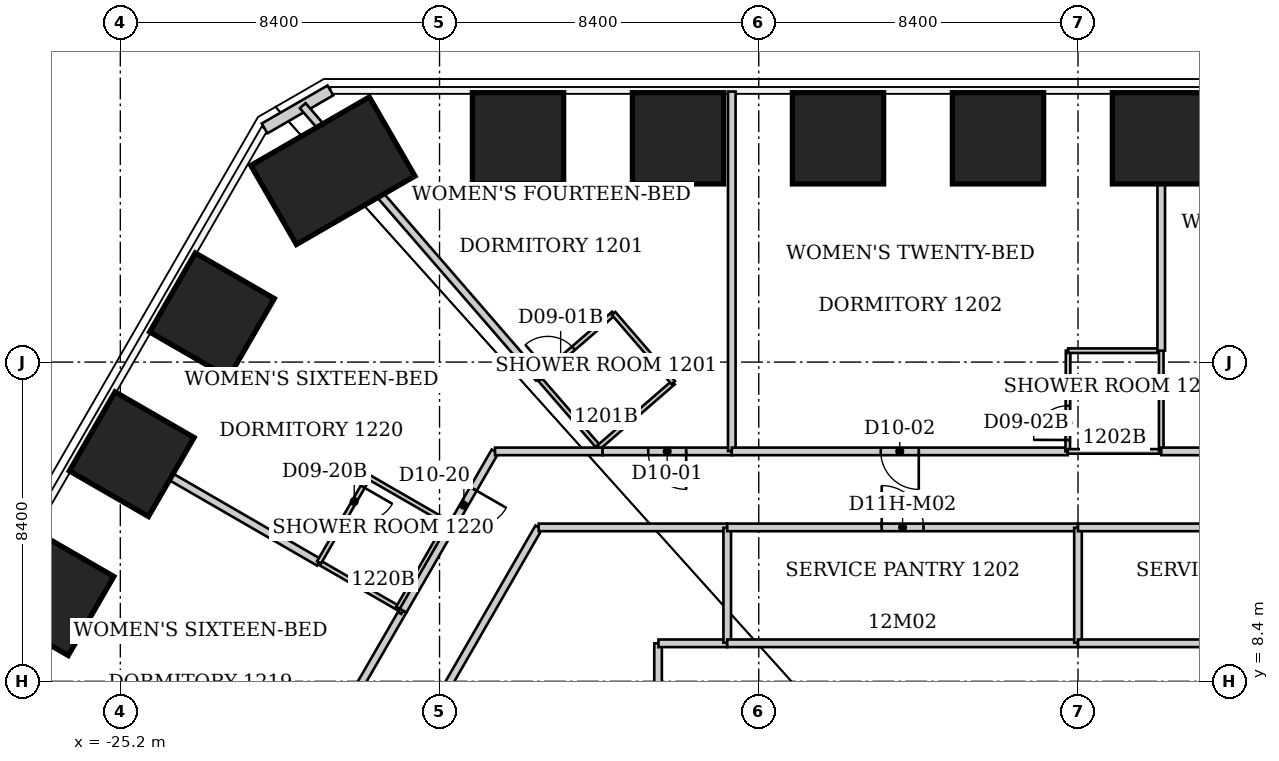
"""IFC4 building model, lengths in metres.
Left out: names, types, materials, properties, quantities, classifications, styles, units other than length and angle.
Written with IfcOpenShell. Run it as: python <this file> out.ifc"""

import sys

from ifc_helpers import new_model, si_unit, direction, frame, frame_2d, origin, origin_2d, place, context, subcontext, project, spatial, rectangle, extrude, clip, halfspace, element, fill, save


model = new_model("IFC4")
c1 = context("Model", 3, precision=1e-05, world=origin(), true_north=direction((0.0, 1.0)))
c2 = subcontext(c1, "Body", "Model", "MODEL_VIEW")
j1 = project(units=[si_unit("LENGTHUNIT", "METRE"), si_unit("PLANEANGLEUNIT", "RADIAN")], contexts=[c1])
p1 = place(None, origin())
s1 = spatial("IfcSite", under=j1, at=p1, CompositionType="ELEMENT")
p2 = place(p1, origin())
s2 = spatial("IfcBuilding", under=s1, at=p2, CompositionType="ELEMENT")
p3 = place(p2, frame((0.0, 0.0, 53.4)))
s3 = spatial("IfcBuildingStorey", under=s2, at=p3, CompositionType="ELEMENT", Elevation=53.4)
p4 = place(p3, frame((-14.735, 22.689, 0.0), z_axis=(0.0, 0.0, 1.0), x_axis=(0.0, 1.0, 0.0)))
e1 = element("IfcColumn", 1, at=p4, inside=s3, PredefinedType="COLUMN", context=c2, shape_type="SweptSolid", body=[
    clip(extrude(rectangle(XDim=2.4, YDim=2.4, at=origin_2d()), origin(), (0.0, 0.0, 1.0), 3.728), halfspace(frame((0.0, 0.0, 3.64)), False)),
])
p5 = place(p3, frame((-10.525, 22.689, 0.0), z_axis=(0.0, 0.0, 1.0), x_axis=(0.0, 1.0, 0.0)))
e2 = element("IfcColumn", 2, at=p5, inside=s3, PredefinedType="COLUMN", context=c2, shape_type="SweptSolid", body=[
    clip(extrude(rectangle(XDim=2.4, YDim=2.4, at=origin_2d()), origin(), (0.0, 0.0, 1.0), 3.736), halfspace(frame((0.0, 0.0, 3.64)), False)),
])
p6 = place(p3, frame((-6.315, 22.689, 0.0), z_axis=(0.0, 0.0, 1.0), x_axis=(0.0, 1.0, 0.0)))
e3 = element("IfcColumn", 3, at=p6, inside=s3, PredefinedType="COLUMN", context=c2, shape_type="SweptSolid", body=[
    clip(extrude(rectangle(XDim=2.4, YDim=2.4, at=origin_2d()), origin(), (0.0, 0.0, 1.0), 3.744), halfspace(frame((0.0, 0.0, 3.64)), False)),
])
for number, where, z_axis, x_axis in (
    (4, (-2.105, 22.689, 0.0), (0.0, 0.0, 1.0), (0.0, 1.0, 0.0)),
    (5, (2.105, 22.689, 0.0), (0.0, 0.0, 1.0), (0.0, 1.0, 0.0)),
):
    element("IfcColumn", number, at=place(p3, frame(where, z_axis=z_axis, x_axis=x_axis)), inside=s3, PredefinedType="COLUMN", context=c2, shape_type="SweptSolid", body=[
        clip(extrude(rectangle(XDim=2.4, YDim=2.4, at=origin_2d()), origin(), (0.0, 0.0, 1.0), 3.752), halfspace(frame((0.0, 0.0, 3.64)), False)),
    ])
p7 = place(p3, frame((-27.01, 10.719, 0.0), z_axis=(0.0, 0.0, 1.0), x_axis=(-0.866025403784, 0.5, 0.0)))
e6 = element("IfcColumn", 6, at=p7, inside=s3, PredefinedType="COLUMN", context=c2, shape_type="SweptSolid", body=[
    clip(extrude(rectangle(XDim=2.4, YDim=2.4, at=origin_2d()), origin(), (0.0, 0.0, 1.0), 3.737), halfspace(frame((0.0, 0.0, 3.64)), False)),
])
p8 = place(p3, frame((-24.899, 14.375, 0.0), z_axis=(0.0, 0.0, 1.0), x_axis=(-0.866025403784, 0.5, 0.0)))
e7 = element("IfcColumn", 7, at=p8, inside=s3, PredefinedType="COLUMN", context=c2, shape_type="SweptSolid", body=[
    clip(extrude(rectangle(XDim=2.4, YDim=2.4, at=origin_2d()), origin(), (0.0, 0.0, 1.0), 3.745), halfspace(frame((0.0, 0.0, 3.64)), False)),
])
p9 = place(p3, frame((-22.788, 18.032, 0.0), z_axis=(0.0, 0.0, 1.0), x_axis=(-0.866025403784, 0.5, 0.0)))
e8 = element("IfcColumn", 8, at=p9, inside=s3, PredefinedType="COLUMN", context=c2, shape_type="SweptSolid", body=[
    clip(extrude(rectangle(XDim=2.4, YDim=2.4, at=origin_2d()), origin(), (0.0, 0.0, 1.0), 3.737), halfspace(frame((0.0, 0.0, 3.64)), False)),
])
p10 = place(p3, frame((-19.606, 21.835, 0.0), z_axis=(0.0, 0.0, 1.0), x_axis=(-0.5, 0.866025403784, 0.0)))
e9 = element("IfcColumn", 9, at=p10, inside=s3, PredefinedType="COLUMN", context=c2, shape_type="SweptSolid", body=[
    clip(extrude(rectangle(XDim=2.4, YDim=3.6, at=origin_2d()), origin(), (0.0, 0.0, 1.0), 3.726), halfspace(frame((0.0, 0.0, 3.64)), False)),
])
p11 = place(p3, frame((-21.404, 22.949, 0.0), z_axis=(0.0, 0.0, 1.0), x_axis=(0.866010750942, 0.50002537861, 0.0)))
e10 = element("IfcWall", 10, at=p11, inside=s3, PredefinedType="SOLIDWALL", context=c2, shape_type="SweptSolid", body=[
    extrude(rectangle(XDim=2.0, YDim=0.3, at=frame_2d((1.0, 0.0))), origin(), (0.0, 0.0, 1.0), 3.64),
])
p12 = place(p3, frame((-25.886, 14.95, 0.0), z_axis=(0.0, 0.0, 1.0), x_axis=(0.865761194987, -0.500457344092, 0.0)))
e11 = element("IfcWall", 11, at=p12, inside=s3, PredefinedType="PARTITIONING", context=c2, shape_type="SweptSolid", body=[
    extrude(rectangle(XDim=6.833, YDim=0.2, at=frame_2d((3.417, 0.0))), origin(), (0.0, 0.0, 1.0), 2.86),
])
p13 = place(p3, frame((-20.748, 5.082, 0.0), z_axis=(0.0, 0.0, 1.0), x_axis=(0.499925128535, 0.86606862653, 0.0)))
e12 = element("IfcWall", 12, at=p13, inside=s3, PredefinedType="PARTITIONING", context=c2, shape_type="SweptSolid", body=[
    extrude(rectangle(XDim=5.979, YDim=0.2, at=frame_2d((2.989, 0.0))), origin(), (0.0, 0.0, 1.0), 3.64),
])
p14 = place(p13, frame((2.489, 0.0, 0.0)))
e13 = element("IfcOpeningElement", 13, at=p14, cuts=e12, PredefinedType="OPENING", context=c2, shape_type="SweptSolid", body=[
    extrude(rectangle(XDim=1.0, YDim=2.13, at=frame_2d((0.5, 1.065))), frame((0.0, 0.1, 0.0), z_axis=(0.0, -1.0, 0.0), x_axis=(1.0, 0.0, 0.0)), (0.0, 0.0, 1.0), 0.2),
])
p15 = place(p3, frame((-20.4, 23.547, 0.0), z_axis=(0.0, 0.0, 1.0), x_axis=(0.65496775452, -0.75565682723, 0.0)))
e14 = element("IfcWall", 14, at=p15, inside=s3, PredefinedType="PARTITIONING", context=c2, shape_type="SweptSolid", body=[
    extrude(rectangle(XDim=9.49, YDim=0.2, at=frame_2d((4.745, 0.0))), origin(), (0.0, 0.0, 1.0), 3.64),
])
p16 = place(p3, frame((-19.97, 11.53, 0.0), z_axis=(0.0, 0.0, 1.0), x_axis=(0.866177122335, -0.499737123639, 0.0)))
e15 = element("IfcWall", 15, at=p16, inside=s3, PredefinedType="PARTITIONING", context=c2, shape_type="SweptSolid", body=[
    extrude(rectangle(XDim=2.401, YDim=0.12, at=frame_2d((1.201, 0.0))), origin(), (0.0, 0.0, 1.0), 2.86),
])
p17 = place(p3, frame((-18.67, 13.78, 0.0), z_axis=(0.0, 0.0, 1.0), x_axis=(-0.500291685314, -0.865856933682, 0.0)))
e16 = element("IfcWall", 16, at=p17, inside=s3, PredefinedType="PARTITIONING", context=c2, shape_type="SweptSolid", body=[
    extrude(rectangle(XDim=2.599, YDim=0.12, at=frame_2d((1.299, 0.0))), origin(), (0.0, 0.0, 1.0), 3.64),
])
p18 = place(p17, frame((0.3, 0.0, 0.0)))
e17 = element("IfcOpeningElement", 17, at=p18, cuts=e16, PredefinedType="OPENING", context=c2, shape_type="SweptSolid", body=[
    extrude(rectangle(XDim=0.9, YDim=2.03, at=frame_2d((0.45, 1.015))), frame((0.0, 0.06, 0.0), z_axis=(0.0, -1.0, 0.0), x_axis=(1.0, 0.0, 0.0)), (0.0, 0.0, 1.0), 0.12),
])
p19 = place(p3, frame((-18.45, 5.06, 0.0), z_axis=(0.0, 0.0, 1.0), x_axis=(0.499424260127, 0.866357552282, 0.0)))
e18 = element("IfcWall", 18, at=p19, inside=s3, PredefinedType="PARTITIONING", context=c2, shape_type="SweptSolid", body=[
    extrude(rectangle(XDim=8.53, YDim=0.2, at=frame_2d((4.265, 0.0))), origin(), (0.0, 0.0, 1.0), 3.64),
])
p20 = place(p3, frame((-17.89, 10.33, 0.0), z_axis=(0.0, 0.0, 1.0), x_axis=(0.500221244143, 0.865897630733, 0.0)))
e19 = element("IfcWall", 19, at=p20, inside=s3, PredefinedType="PARTITIONING", context=c2, shape_type="SweptSolid", body=[
    extrude(rectangle(XDim=2.598, YDim=0.12, at=frame_2d((1.299, 0.0))), origin(), (0.0, 0.0, 1.0), 3.64),
])
p21 = place(p3, frame((-17.837, 10.302, 0.0), z_axis=(0.0, 0.0, 1.0), x_axis=(0.880650010303, -0.473767410606, 0.0)))
e20 = element("IfcWall", 20, at=p21, inside=s3, PredefinedType="PARTITIONING", context=c2, shape_type="SweptSolid", body=[
    extrude(rectangle(XDim=0.088, YDim=0.2, at=frame_2d((0.044, 0.0))), origin(), (0.0, 0.0, 1.0), 3.64),
])
p22 = place(p3, frame((-17.759, 10.259, 0.0), z_axis=(0.0, 0.0, 1.0), x_axis=(0.499878240725, 0.866095690123, 0.0)))
e21 = element("IfcWall", 21, at=p22, inside=s3, PredefinedType="PARTITIONING", context=c2, shape_type="SweptSolid", body=[
    extrude(rectangle(XDim=4.839, YDim=0.2, at=frame_2d((2.419, 0.0))), origin(), (0.0, 0.0, 1.0), 3.64),
])
p23 = place(p22, frame((2.7, 0.0, 0.0)))
e22 = element("IfcOpeningElement", 22, at=p23, cuts=e21, PredefinedType="OPENING", context=c2, shape_type="SweptSolid", body=[
    extrude(rectangle(XDim=1.0, YDim=2.13, at=frame_2d((0.5, 1.065))), frame((0.0, 0.1, 0.0), z_axis=(0.0, -1.0, 0.0), x_axis=(1.0, 0.0, 0.0)), (0.0, 0.0, 1.0), 0.2),
])
p24 = place(p3, frame((-16.59, 12.58, 0.0), z_axis=(0.0, 0.0, 1.0), x_axis=(-0.866177122335, 0.499737123639, 0.0)))
e23 = element("IfcWall", 23, at=p24, inside=s3, PredefinedType="PARTITIONING", context=c2, shape_type="SweptSolid", body=[
    extrude(rectangle(XDim=2.401, YDim=0.12, at=frame_2d((1.201, 0.0))), origin(), (0.0, 0.0, 1.0), 3.64),
])
p25 = place(p3, frame((-14.19, 12.45, 0.0), z_axis=(0.0, 0.0, 1.0), x_axis=(1.0, 0.0, 0.0)))
e24 = element("IfcWall", 24, at=p25, inside=s3, PredefinedType="PARTITIONING", context=c2, shape_type="SweptSolid", body=[
    extrude(rectangle(XDim=4.96, YDim=0.2, at=frame_2d((2.48, 0.0))), origin(), (0.0, 0.0, 1.0), 3.64),
])
p26 = place(p3, frame((-14.185, 16.376, 0.0), z_axis=(0.0, 0.0, 1.0), x_axis=(0.655147063502, -0.755501373384, 0.0)))
e25 = element("IfcWall", 25, at=p26, inside=s3, PredefinedType="PARTITIONING", context=c2, shape_type="SweptSolid", body=[
    extrude(rectangle(XDim=2.404, YDim=0.12, at=frame_2d((1.202, 0.0))), origin(), (0.0, 0.0, 1.0), 3.64),
])
p27 = place(p3, frame((-12.61, 14.56, 0.0), z_axis=(0.0, 0.0, 1.0), x_axis=(0.755437535555, 0.655220672655, 0.0)))
e26 = element("IfcWall", 26, at=p27, inside=s3, PredefinedType="PARTITIONING", context=c2, shape_type="SweptSolid", body=[
    extrude(rectangle(XDim=2.594, YDim=0.12, at=frame_2d((1.297, 0.0))), origin(), (0.0, 0.0, 1.0), 3.64),
])
p28 = place(p3, frame((-12.51, 14.45, 0.0), z_axis=(0.0, 0.0, 1.0), x_axis=(-1.0, 0.0, 0.0)))
e27 = element("IfcWall", 27, at=p28, inside=s3, PredefinedType="PARTITIONING", context=c2, shape_type="SweptSolid", body=[
    extrude(rectangle(XDim=2.83, YDim=0.2, at=frame_2d((1.415, 0.0))), origin(), (0.0, 0.0, 1.0), 3.64),
])
p29 = place(p3, frame((-12.22, 18.08, 0.0), z_axis=(0.0, 0.0, 1.0), x_axis=(-0.755437535555, -0.655220672655, 0.0)))
e28 = element("IfcWall", 28, at=p29, inside=s3, PredefinedType="PARTITIONING", context=c2, shape_type="SweptSolid", body=[
    extrude(rectangle(XDim=2.594, YDim=0.12, at=frame_2d((1.297, 0.0))), origin(), (0.0, 0.0, 1.0), 3.64),
])
p30 = place(p29, frame((1.395, 0.0, 0.0)))
e29 = element("IfcOpeningElement", 29, at=p30, cuts=e28, PredefinedType="OPENING", context=c2, shape_type="SweptSolid", body=[
    extrude(rectangle(XDim=0.9, YDim=2.03, at=frame_2d((0.45, 1.015))), frame((0.0, 0.06, 0.0), z_axis=(0.0, -1.0, 0.0), x_axis=(1.0, 0.0, 0.0)), (0.0, 0.0, 1.0), 0.12),
])
p31 = place(p3, frame((-11.05, 9.4, 0.0), z_axis=(0.0, 0.0, 1.0), x_axis=(0.0, -1.0, 0.0)))
e30 = element("IfcWall", 30, at=p31, inside=s3, PredefinedType="PARTITIONING", context=c2, shape_type="SweptSolid", body=[
    extrude(rectangle(XDim=17.16, YDim=0.2, at=frame_2d((8.58, 0.0))), origin(), (0.0, 0.0, 1.0), 3.64),
])
p32 = place(p31, frame((8.03, 0.0, 0.0)))
e31 = element("IfcOpeningElement", 31, at=p32, cuts=e30, PredefinedType="OPENING", context=c2, shape_type="SweptSolid", body=[
    extrude(rectangle(XDim=1.1, YDim=2.2, at=frame_2d((0.55, 1.1))), frame((0.0, 0.1, 0.0), z_axis=(0.0, -1.0, 0.0), x_axis=(1.0, 0.0, 0.0)), (0.0, 0.0, 1.0), 0.2),
])
p33 = place(p3, frame((-10.65, 16.26, 0.0), z_axis=(0.0, 0.0, 1.0), x_axis=(-0.653188728136, 0.757195143563, 0.0)))
e32 = element("IfcWall", 32, at=p33, inside=s3, PredefinedType="PARTITIONING", context=c2, shape_type="SweptSolid", body=[
    extrude(rectangle(XDim=2.404, YDim=0.12, at=frame_2d((1.202, 0.0))), origin(), (0.0, 0.0, 1.0), 3.64),
])
p34 = place(p3, frame((-9.23, 9.4, 0.0), z_axis=(0.0, 0.0, 1.0), x_axis=(-1.0, 0.0, 0.0)))
e33 = element("IfcWall", 33, at=p34, inside=s3, PredefinedType="PARTITIONING", context=c2, shape_type="SweptSolid", body=[
    extrude(rectangle(XDim=1.81, YDim=0.2, at=frame_2d((0.905, 0.0))), origin(), (0.0, 0.0, 1.0), 3.64),
])
p35 = place(p3, frame((-9.23, 12.44, 0.0), z_axis=(0.0, 0.0, 1.0), x_axis=(0.0, -1.0, 0.0)))
e34 = element("IfcWall", 34, at=p35, inside=s3, PredefinedType="PARTITIONING", context=c2, shape_type="SweptSolid", body=[
    extrude(rectangle(XDim=3.025, YDim=0.2, at=frame_2d((1.512, 0.0))), origin(), (0.0, 0.0, 1.0), 3.64),
])
p36 = place(p3, frame((-9.23, 12.45, 0.0), z_axis=(0.0, 0.0, 1.0), x_axis=(1.0, 0.0, 0.0)))
e35 = element("IfcWall", 35, at=p36, inside=s3, PredefinedType="PARTITIONING", context=c2, shape_type="SweptSolid", body=[
    extrude(rectangle(XDim=9.23, YDim=0.2, at=frame_2d((4.615, 0.0))), origin(), (0.0, 0.0, 1.0), 3.64),
])
p37 = place(p36, frame((4.065, 0.0, 0.0)))
e36 = element("IfcOpeningElement", 36, at=p37, cuts=e35, PredefinedType="OPENING", context=c2, shape_type="SweptSolid", body=[
    extrude(rectangle(XDim=1.1, YDim=2.2, at=frame_2d((0.55, 1.1))), frame((0.0, 0.1, 0.0), z_axis=(0.0, -1.0, 0.0), x_axis=(1.0, 0.0, 0.0)), (0.0, 0.0, 1.0), 0.2),
])
p38 = place(p3, frame((-9.11, 14.45, 0.0), z_axis=(0.0, 0.0, 1.0), x_axis=(-1.0, 0.0, 0.0)))
e37 = element("IfcWall", 37, at=p38, inside=s3, PredefinedType="PARTITIONING", context=c2, shape_type="SweptSolid", body=[
    extrude(rectangle(XDim=3.4, YDim=0.2, at=frame_2d((1.7, 0.0))), origin(), (0.0, 0.0, 1.0), 3.64),
])
p39 = place(p38, frame((1.2, 0.0, 0.0)))
e38 = element("IfcOpeningElement", 38, at=p39, cuts=e37, PredefinedType="OPENING", context=c2, shape_type="SweptSolid", body=[
    extrude(rectangle(XDim=1.0, YDim=2.13, at=frame_2d((0.5, 1.065))), frame((0.0, 0.1, 0.0), z_axis=(0.0, -1.0, 0.0), x_axis=(1.0, 0.0, 0.0)), (0.0, 0.0, 1.0), 0.2),
])
p40 = place(p3, frame((-9.11, 23.92, 0.0), z_axis=(0.0, 0.0, 1.0), x_axis=(0.0, -1.0, 0.0)))
e39 = element("IfcWall", 39, at=p40, inside=s3, PredefinedType="PARTITIONING", context=c2, shape_type="SweptSolid", body=[
    extrude(rectangle(XDim=9.46, YDim=0.2, at=frame_2d((4.73, 0.0))), origin(), (0.0, 0.0, 1.0), 3.64),
])
p41 = place(p3, frame((-0.27, 14.45, 0.0), z_axis=(0.0, 0.0, 1.0), x_axis=(-1.0, 0.0, 0.0)))
e40 = element("IfcWall", 40, at=p41, inside=s3, PredefinedType="PARTITIONING", context=c2, shape_type="SweptSolid", body=[
    extrude(rectangle(XDim=8.84, YDim=0.2, at=frame_2d((4.42, 0.0))), origin(), (0.0, 0.0, 1.0), 3.64),
])
p42 = place(p41, frame((3.92, 0.0, 0.0)))
e41 = element("IfcOpeningElement", 41, at=p42, cuts=e40, PredefinedType="OPENING", context=c2, shape_type="SweptSolid", body=[
    extrude(rectangle(XDim=1.0, YDim=2.13, at=frame_2d((0.5, 1.065))), frame((0.0, 0.1, 0.0), z_axis=(0.0, -1.0, 0.0), x_axis=(1.0, 0.0, 0.0)), (0.0, 0.0, 1.0), 0.2),
])
p43 = place(p3, frame((-0.26, 17.1, 0.0), z_axis=(0.0, 0.0, 1.0), x_axis=(-0.00377703432, -0.99999286698, 0.0)))
e42 = element("IfcWall", 42, at=p43, inside=s3, PredefinedType="PARTITIONING", context=c2, shape_type="SweptSolid", body=[
    extrude(rectangle(XDim=2.65, YDim=0.12, at=frame_2d((1.325, 0.0))), origin(), (0.0, 0.0, 1.0), 3.64),
])
p44 = place(p43, frame((1.45, 0.0, 0.0)))
e43 = element("IfcOpeningElement", 43, at=p44, cuts=e42, PredefinedType="OPENING", context=c2, shape_type="SweptSolid", body=[
    extrude(rectangle(XDim=0.9, YDim=2.03, at=frame_2d((0.45, 1.015))), frame((0.0, 0.06, 0.0), z_axis=(0.0, -1.0, 0.0), x_axis=(1.0, 0.0, 0.0)), (0.0, 0.0, 1.0), 0.12),
])
p45 = place(p3, frame((0.0, 9.4, 0.0), z_axis=(0.0, 0.0, 1.0), x_axis=(-1.0, 0.0, 0.0)))
e44 = element("IfcWall", 44, at=p45, inside=s3, PredefinedType="PARTITIONING", context=c2, shape_type="SweptSolid", body=[
    extrude(rectangle(XDim=9.23, YDim=0.2, at=frame_2d((4.615, 0.0))), origin(), (0.0, 0.0, 1.0), 3.64),
])
p46 = place(p3, frame((0.0, 12.44, 0.0), z_axis=(0.0, 0.0, 1.0), x_axis=(0.0, -1.0, 0.0)))
e45 = element("IfcWall", 45, at=p46, inside=s3, PredefinedType="PARTITIONING", context=c2, shape_type="SweptSolid", body=[
    extrude(rectangle(XDim=3.025, YDim=0.2, at=frame_2d((1.512, 0.0))), origin(), (0.0, 0.0, 1.0), 2.878),
])
p47 = place(p3, frame((0.0, 12.45, 0.0), z_axis=(0.0, 0.0, 1.0), x_axis=(1.0, 0.0, 0.0)))
e46 = element("IfcWall", 46, at=p47, inside=s3, PredefinedType="PARTITIONING", context=c2, shape_type="SweptSolid", body=[
    extrude(rectangle(XDim=9.23, YDim=0.2, at=frame_2d((4.615, 0.0))), origin(), (0.0, 0.0, 1.0), 3.64),
])
p48 = place(p47, frame((4.065, 0.0, 0.0)))
e47 = element("IfcOpeningElement", 47, at=p48, cuts=e46, PredefinedType="OPENING", context=c2, shape_type="SweptSolid", body=[
    extrude(rectangle(XDim=1.1, YDim=2.2, at=frame_2d((0.55, 1.1))), frame((0.0, 0.1, 0.0), z_axis=(0.0, -1.0, 0.0), x_axis=(1.0, 0.0, 0.0)), (0.0, 0.0, 1.0), 0.2),
])
p49 = place(p3, frame((2.19, 14.45, 0.0), z_axis=(0.0, 0.0, 1.0), x_axis=(-1.0, 0.0, 0.0)))
e48 = element("IfcWall", 48, at=p49, inside=s3, PredefinedType="PARTITIONING", context=c2, shape_type="SweptSolid", body=[
    extrude(rectangle(XDim=2.46, YDim=0.12, at=frame_2d((1.23, 0.0))), origin(), (0.0, 0.0, 1.0), 3.64),
])
p50 = place(p3, frame((2.19, 17.1, 0.0), z_axis=(0.0, 0.0, 1.0), x_axis=(-1.0, 0.0, 0.0)))
e49 = element("IfcWall", 49, at=p50, inside=s3, PredefinedType="PARTITIONING", context=c2, shape_type="SweptSolid", body=[
    extrude(rectangle(XDim=2.45, YDim=0.12, at=frame_2d((1.225, 0.0))), origin(), (0.0, 0.0, 1.0), 3.64),
])
p51 = place(p3, frame((2.19, 17.1, 0.0), z_axis=(0.0, 0.0, 1.0), x_axis=(0.0, -1.0, 0.0)))
e50 = element("IfcWall", 50, at=p51, inside=s3, PredefinedType="PARTITIONING", context=c2, shape_type="SweptSolid", body=[
    extrude(rectangle(XDim=2.65, YDim=0.12, at=frame_2d((1.325, 0.0))), origin(), (0.0, 0.0, 1.0), 2.878),
])
p52 = place(p3, frame((2.19, 23.83, 0.0), z_axis=(0.0, 0.0, 1.0), x_axis=(0.0, -1.0, 0.0)))
e51 = element("IfcWall", 51, at=p52, inside=s3, PredefinedType="PARTITIONING", context=c2, shape_type="SweptSolid", body=[
    extrude(rectangle(XDim=6.73, YDim=0.2, at=frame_2d((3.365, 0.0))), origin(), (0.0, 0.0, 1.0), 2.878),
])
p53 = place(p3, frame((8.53, 14.45, 0.0), z_axis=(0.0, 0.0, 1.0), x_axis=(-1.0, 0.0, 0.0)))
e52 = element("IfcWall", 52, at=p53, inside=s3, PredefinedType="PARTITIONING", context=c2, shape_type="SweptSolid", body=[
    extrude(rectangle(XDim=6.34, YDim=0.2, at=frame_2d((3.17, 0.0))), origin(), (0.0, 0.0, 1.0), 3.64),
])
p54 = place(p53, frame((2.67, 0.0, 0.0)))
e53 = element("IfcOpeningElement", 53, at=p54, cuts=e52, PredefinedType="OPENING", context=c2, shape_type="SweptSolid", body=[
    extrude(rectangle(XDim=1.0, YDim=2.13, at=frame_2d((0.5, 1.065))), frame((0.0, 0.1, 0.0), z_axis=(0.0, -1.0, 0.0), x_axis=(1.0, 0.0, 0.0)), (0.0, 0.0, 1.0), 0.2),
])
p55 = place(p3, frame((9.23, 9.4, 0.0), z_axis=(0.0, 0.0, 1.0), x_axis=(-1.0, 0.0, 0.0)))
e54 = element("IfcWall", 54, at=p55, inside=s3, PredefinedType="PARTITIONING", context=c2, shape_type="SweptSolid", body=[
    extrude(rectangle(XDim=9.23, YDim=0.2, at=frame_2d((4.615, 0.0))), origin(), (0.0, 0.0, 1.0), 3.64),
])
p56 = place(p39, origin())
e55 = element("IfcDoor", 55, at=p56, inside=s3, OperationType="SINGLE_SWING_LEFT", PredefinedType="DOOR", context=c2, shape_type="SweptSolid", body=[
    extrude(rectangle(XDim=1.0, YDim=2.13, at=frame_2d((0.5, 1.065))), frame((0.0, 0.025, 0.0), z_axis=(0.0, -1.0, 0.0), x_axis=(1.0, 0.0, 0.0)), (0.0, 0.0, 1.0), 0.05),
])
fill(e38, e55)
p57 = place(p30, origin())
e56 = element("IfcDoor", 56, at=p57, inside=s3, OperationType="SINGLE_SWING_RIGHT", PredefinedType="DOOR", context=c2, shape_type="SweptSolid", body=[
    extrude(rectangle(XDim=0.9, YDim=2.03, at=frame_2d((0.45, 1.015))), frame((0.0, 0.025, 0.0), z_axis=(0.0, -1.0, 0.0), x_axis=(1.0, 0.0, 0.0)), (0.0, 0.0, 1.0), 0.05),
])
fill(e29, e56)
p58 = place(p42, origin())
e57 = element("IfcDoor", 57, at=p58, inside=s3, OperationType="SINGLE_SWING_LEFT", PredefinedType="DOOR", context=c2, shape_type="SweptSolid", body=[
    extrude(rectangle(XDim=1.0, YDim=2.13, at=frame_2d((0.5, 1.065))), frame((0.0, 0.025, 0.0), z_axis=(0.0, -1.0, 0.0), x_axis=(1.0, 0.0, 0.0)), (0.0, 0.0, 1.0), 0.05),
])
fill(e41, e57)
p59 = place(p44, origin())
e58 = element("IfcDoor", 58, at=p59, inside=s3, OperationType="SINGLE_SWING_RIGHT", PredefinedType="DOOR", context=c2, shape_type="SweptSolid", body=[
    extrude(rectangle(XDim=0.9, YDim=2.03, at=frame_2d((0.45, 1.015))), frame((0.0, 0.025, 0.0), z_axis=(0.0, -1.0, 0.0), x_axis=(1.0, 0.0, 0.0)), (0.0, 0.0, 1.0), 0.05),
])
fill(e43, e58)
p60 = place(p23, origin())
e59 = element("IfcDoor", 59, at=p60, inside=s3, OperationType="SINGLE_SWING_RIGHT", PredefinedType="DOOR", context=c2, shape_type="SweptSolid", body=[
    extrude(rectangle(XDim=1.0, YDim=2.13, at=frame_2d((0.5, 1.065))), frame((0.0, 0.025, 0.0), z_axis=(0.0, -1.0, 0.0), x_axis=(1.0, 0.0, 0.0)), (0.0, 0.0, 1.0), 0.05),
])
fill(e22, e59)
p61 = place(p18, origin())
e60 = element("IfcDoor", 60, at=p61, inside=s3, OperationType="SINGLE_SWING_LEFT", PredefinedType="DOOR", context=c2, shape_type="SweptSolid", body=[
    extrude(rectangle(XDim=0.9, YDim=2.03, at=frame_2d((0.45, 1.015))), frame((0.0, 0.025, 0.0), z_axis=(0.0, -1.0, 0.0), x_axis=(1.0, 0.0, 0.0)), (0.0, 0.0, 1.0), 0.05),
])
fill(e17, e60)
p62 = place(p37, origin())
e61 = element("IfcDoor", 61, at=p62, inside=s3, OperationType="SINGLE_SWING_LEFT", PredefinedType="DOOR", context=c2, shape_type="SweptSolid", body=[
    extrude(rectangle(XDim=1.1, YDim=2.2, at=frame_2d((0.55, 1.1))), frame((0.0, 0.025, 0.0), z_axis=(0.0, -1.0, 0.0), x_axis=(1.0, 0.0, 0.0)), (0.0, 0.0, 1.0), 0.05),
])
fill(e36, e61)
save(model, sys.argv[1])
